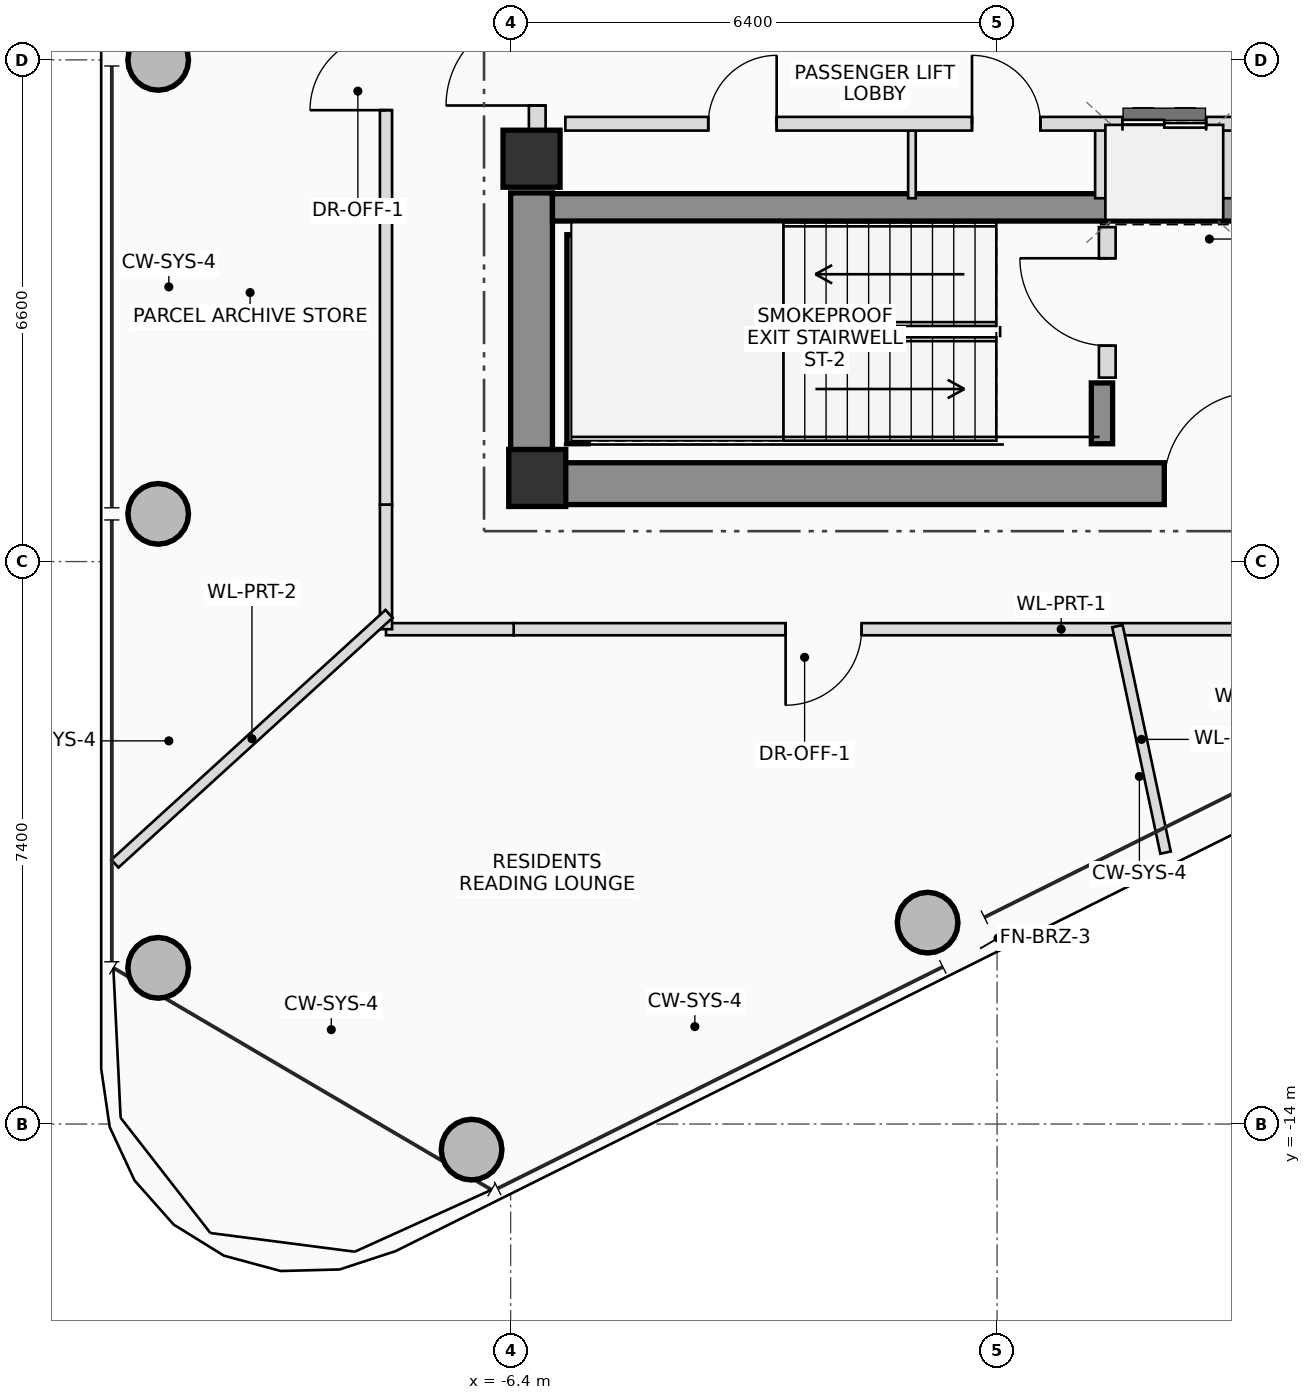
"""IFC4 building model, lengths in metres.
Left out: names, types, materials, properties, quantities, classifications, styles, units other than length and angle.
Written with IfcOpenShell. Run it as: python <this file> out.ifc"""

import sys

from ifc_helpers import new_model, si_unit, direction, frame, frame_2d, origin, origin_2d, place, context, subcontext, project, spatial, rectangle, hollow_circle, extrude, source, transform, mapped, element, fill, save


model = new_model("IFC4")
c1 = context("Model", 3, precision=1e-05, world=origin(), true_north=direction((0.0, 1.0)))
c2 = subcontext(c1, "Body", "Model", "MODEL_VIEW")
j1 = project(units=[si_unit("LENGTHUNIT", "METRE"), si_unit("PLANEANGLEUNIT", "RADIAN")], contexts=[c1])
p1 = place(None, origin())
s1 = spatial("IfcSite", under=j1, at=p1, CompositionType="ELEMENT")
p2 = place(p1, origin())
s2 = spatial("IfcBuilding", under=s1, at=p2, CompositionType="ELEMENT")
p3 = place(p2, frame((0.0, 0.0, 293.3)))
s3 = spatial("IfcBuildingStorey", under=s2, at=p3, CompositionType="ELEMENT", Elevation=293.3)
m1 = source(origin(), c2, "Body", "SweptSolid", [
    extrude(rectangle(XDim=0.75, YDim=0.75, at=origin_2d()), origin(), (0.0, 0.0, 1.0), 3.45),
])
p4 = place(p3, frame((-6.05, -5.5, 0.0), z_axis=(0.0, 0.0, 1.0), x_axis=(1.0, 0.0, 0.0)))
e1 = element("IfcColumn", 1, at=p4, inside=s3, PredefinedType="COLUMN", context=c2, shape_type="MappedRepresentation", body=[
    mapped(m1, transform((0.0, 0.0, 0.0), scale=1.0)),
])
p5 = place(p3, frame((-6.4, -5.575, 0.0), z_axis=(0.0, 0.0, 1.0), x_axis=(1.0, 0.0, 0.0)))
e2 = element("IfcWall", 2, at=p5, inside=s3, PredefinedType="SHEAR", context=c2, shape_type="SweptSolid", body=[
    extrude(rectangle(XDim=12.8, YDim=0.55, at=frame_2d((6.4, 0.0))), origin(), (0.0, 0.0, 1.0), 3.45),
])
p6 = place(p5, frame((8.6, 0.0, 0.0)))
e3 = element("IfcOpeningElement", 3, at=p6, cuts=e2, PredefinedType="OPENING", context=c2, shape_type="SweptSolid", body=[
    extrude(rectangle(XDim=1.2, YDim=2.2, at=frame_2d((0.6, 1.1))), frame((0.0, 0.285, 0.0), z_axis=(0.0, -1.0, 0.0), x_axis=(1.0, 0.0, 0.0)), (0.0, 0.0, 1.0), 0.57),
])
p7 = place(p3, frame((-6.125, -5.3, 0.0), z_axis=(0.0, 0.0, 1.0), x_axis=(0.0, 1.0, 0.0)))
e4 = element("IfcWall", 4, at=p7, inside=s3, PredefinedType="SHEAR", context=c2, shape_type="SweptSolid", body=[
    extrude(rectangle(XDim=3.55, YDim=0.55, at=frame_2d((1.775, 0.0))), origin(), (0.0, 0.0, 1.0), 3.45),
])
p8 = place(p3, frame((-5.85, -1.94, 0.0), z_axis=(0.0, 0.0, 1.0), x_axis=(1.0, 0.0, 0.0)))
e5 = element("IfcWall", 5, at=p8, inside=s3, PredefinedType="SHEAR", context=c2, shape_type="SweptSolid", body=[
    extrude(rectangle(XDim=11.7, YDim=0.36, at=frame_2d((5.85, 0.0))), origin(), (0.0, 0.0, 1.0), 3.45),
])
p9 = place(p3, frame((-5.52, -5.05, 0.0), z_axis=(0.0, 0.0, 1.0), x_axis=(0.0, 1.0, 0.0)))
e6 = element("IfcWall", 6, at=p9, inside=s3, PredefinedType="SHEAR", context=c2, shape_type="SweptSolid", body=[
    extrude(rectangle(XDim=2.75, YDim=0.28, at=frame_2d((1.375, 0.0))), origin(), (0.0, 0.0, 1.0), 3.45),
])
p10 = place(p3, frame((1.38, -5.05, 0.0), z_axis=(0.0, 0.0, 1.0), x_axis=(0.0, 1.0, 0.0)))
e7 = element("IfcWall", 7, at=p10, inside=s3, PredefinedType="SHEAR", context=c2, shape_type="SweptSolid", body=[
    extrude(rectangle(XDim=0.8, YDim=0.28, at=frame_2d((0.4, 0.0))), origin(), (0.0, 0.0, 1.0), 3.45),
])
p11 = place(p3, frame((-6.125, -1.3, 0.0), z_axis=(0.0, 0.0, 1.0), x_axis=(1.0, 0.0, 0.0)))
e8 = element("IfcColumn", 8, at=p11, inside=s3, PredefinedType="COLUMN", context=c2, shape_type="MappedRepresentation", body=[
    mapped(m1, transform((0.0, 0.0, 0.0), scale=1.0)),
])
m2 = source(origin(), c2, "Body", "SweptSolid", [
    extrude(hollow_circle(Radius=0.4, WallThickness=0.028, at=origin_2d()), origin(), (0.0, 0.0, 1.0), 3.45),
])
for number, where, z_axis, x_axis in (
    (9, (-6.914, -14.337, 0.0), (0.0, 0.0, 1.0), (1.0, 0.0, 0.0)),
    (10, (-0.914, -11.35, 0.0), (0.0, 0.0, 1.0), (1.0, 0.0, 0.0)),
    (11, (-11.037, 0.0, 0.0), (0.0, 0.0, 1.0), (1.0, 0.0, 0.0)),
    (12, (-11.037, -5.973, 0.0), (0.0, 0.0, 1.0), (1.0, 0.0, 0.0)),
    (13, (-11.037, -11.945, 0.0), (0.0, 0.0, 1.0), (1.0, 0.0, 0.0)),
):
    element("IfcColumn", number, at=place(p3, frame(where, z_axis=z_axis, x_axis=x_axis)), inside=s3, PredefinedType="COLUMN", context=c2, shape_type="MappedRepresentation", body=[
        mapped(m2, transform((0.0, 0.0, 0.0), scale=1.0)),
    ])
p12 = place(p3, frame((-6.05, -0.95, 0.0), z_axis=(0.0, 0.0, 1.0), x_axis=(0.0, 1.0, 0.0)))
e14 = element("IfcWall", 14, at=p12, inside=s3, PredefinedType="PLUMBINGWALL", context=c2, shape_type="SweptSolid", body=[
    extrude(rectangle(XDim=1.9, YDim=0.22, at=frame_2d((0.95, 0.0))), origin(), (0.0, 0.0, 1.0), 2.23),
])
p13 = place(p12, frame((0.35, 0.0, 0.0)))
e15 = element("IfcOpeningElement", 15, at=p13, cuts=e14, PredefinedType="OPENING", context=c2, shape_type="SweptSolid", body=[
    extrude(rectangle(XDim=1.2, YDim=2.2, at=frame_2d((0.6, 1.1))), frame((0.0, 0.12, 0.0), z_axis=(0.0, -1.0, 0.0), x_axis=(1.0, 0.0, 0.0)), (0.0, 0.0, 1.0), 0.24),
])
p14 = place(p3, frame((1.45, -4.18, 0.0), z_axis=(0.0, 0.0, 1.0), x_axis=(0.0, 1.0, 0.0)))
e16 = element("IfcWall", 16, at=p14, inside=s3, PredefinedType="PLUMBINGWALL", context=c2, shape_type="SweptSolid", body=[
    extrude(rectangle(XDim=1.98, YDim=0.22, at=frame_2d((0.99, 0.0))), origin(), (0.0, 0.0, 1.0), 3.25),
])
p15 = place(p14, frame((0.42, 0.0, 0.0)))
e17 = element("IfcOpeningElement", 17, at=p15, cuts=e16, PredefinedType="OPENING", context=c2, shape_type="SweptSolid", body=[
    extrude(rectangle(XDim=1.15, YDim=2.15, at=frame_2d((0.575, 1.075))), frame((0.0, 0.12, 0.0), z_axis=(0.0, -1.0, 0.0), x_axis=(1.0, 0.0, 0.0)), (0.0, 0.0, 1.0), 0.24),
])
p16 = place(p3, frame((-1.12, -1.82, 0.0), z_axis=(0.0, 0.0, 1.0), x_axis=(0.0, 1.0, 0.0)))
e18 = element("IfcWall", 18, at=p16, inside=s3, PredefinedType="PARTITIONING", context=c2, shape_type="SweptSolid", body=[
    extrude(rectangle(XDim=0.98, YDim=0.1, at=frame_2d((0.49, 0.0))), origin(), (0.0, 0.0, 1.0), 3.25),
])
for number, where, z_axis, x_axis in (
    (19, (1.38, -1.82, 0.0), (0.0, 0.0, 1.0), (0.0, 1.0, 0.0)),
    (20, (3.02, -1.82, 0.0), (0.0, 0.0, 1.0), (0.0, 1.0, 0.0)),
):
    element("IfcWall", number, at=place(p3, frame(where, z_axis=z_axis, x_axis=x_axis)), inside=s3, PredefinedType="PLUMBINGWALL", context=c2, shape_type="SweptSolid", body=[
        extrude(rectangle(XDim=0.98, YDim=0.18, at=frame_2d((0.49, 0.0))), origin(), (0.0, 0.0, 1.0), 3.25),
    ])
p17 = place(p3, frame((-5.68, -0.84, 0.0), z_axis=(0.0, 0.0, 1.0), x_axis=(1.0, 0.0, 0.0)))
e21 = element("IfcWall", 21, at=p17, inside=s3, PredefinedType="PLUMBINGWALL", context=c2, shape_type="SweptSolid", body=[
    extrude(rectangle(XDim=11.33, YDim=0.18, at=frame_2d((5.665, 0.0))), origin(), (0.0, 0.0, 1.0), 3.25),
])
p18 = place(p17, frame((1.88, 0.0, 0.0)))
e22 = element("IfcOpeningElement", 22, at=p18, cuts=e21, PredefinedType="OPENING", context=c2, shape_type="SweptSolid", body=[
    extrude(rectangle(XDim=0.9, YDim=2.05, at=frame_2d((0.45, 1.025))), frame((0.0, 0.1, 0.0), z_axis=(0.0, -1.0, 0.0), x_axis=(1.0, 0.0, 0.0)), (0.0, 0.0, 1.0), 0.2),
])
p19 = place(p17, frame((5.35, 0.0, 0.0)))
e23 = element("IfcOpeningElement", 23, at=p19, cuts=e21, PredefinedType="OPENING", context=c2, shape_type="SweptSolid", body=[
    extrude(rectangle(XDim=0.9, YDim=2.05, at=frame_2d((0.45, 1.025))), frame((0.0, 0.1, 0.0), z_axis=(0.0, -1.0, 0.0), x_axis=(1.0, 0.0, 0.0)), (0.0, 0.0, 1.0), 0.2),
])
p20 = place(p17, frame((7.33, 0.0, 0.0)))
e24 = element("IfcOpeningElement", 24, at=p20, cuts=e21, PredefinedType="OPENING", context=c2, shape_type="SweptSolid", body=[
    extrude(rectangle(XDim=1.1, YDim=2.2, at=frame_2d((0.55, 1.1))), frame((0.0, 0.1, 0.0), z_axis=(0.0, -1.0, 0.0), x_axis=(1.0, 0.0, 0.0)), (0.0, 0.0, 1.0), 0.2),
])
p21 = place(p17, frame((8.9, 0.0, 0.0)))
e25 = element("IfcOpeningElement", 25, at=p21, cuts=e21, PredefinedType="OPENING", context=c2, shape_type="SweptSolid", body=[
    extrude(rectangle(XDim=0.9, YDim=2.05, at=frame_2d((0.45, 1.025))), frame((0.0, 0.1, 0.0), z_axis=(0.0, -1.0, 0.0), x_axis=(1.0, 0.0, 0.0)), (0.0, 0.0, 1.0), 0.2),
])
p22 = place(p17, frame((10.25, 0.0, 0.0)))
e26 = element("IfcOpeningElement", 26, at=p22, cuts=e21, PredefinedType="OPENING", context=c2, shape_type="SweptSolid", body=[
    extrude(rectangle(XDim=0.9, YDim=2.05, at=frame_2d((0.45, 1.025))), frame((0.0, 0.1, 0.0), z_axis=(0.0, -1.0, 0.0), x_axis=(1.0, 0.0, 0.0)), (0.0, 0.0, 1.0), 0.2),
])
p23 = place(p3, frame((3.319, -7.49, 0.0), z_axis=(0.0, 0.0, 1.0), x_axis=(-1.0, 0.0, 0.0)))
e27 = element("IfcWall", 27, at=p23, inside=s3, PredefinedType="PARTITIONING", context=c2, shape_type="SweptSolid", body=[
    extrude(rectangle(XDim=9.679, YDim=0.16, at=frame_2d((4.84, 0.0))), origin(), (0.0, 0.0, 1.0), 2.655),
])
p24 = place(p23, frame((5.101, 0.0, 0.0)))
e28 = element("IfcOpeningElement", 28, at=p24, cuts=e27, PredefinedType="OPENING", context=c2, shape_type="SweptSolid", body=[
    extrude(rectangle(XDim=1.0, YDim=2.25, at=frame_2d((0.5, 1.125))), frame((0.0, 0.09, 0.0), z_axis=(0.0, -1.0, 0.0), x_axis=(1.0, 0.0, 0.0)), (0.0, 0.0, 1.0), 0.18),
])
p25 = place(p3, frame((-6.36, -7.49, 0.0), z_axis=(0.0, 0.0, 1.0), x_axis=(-1.0, 0.0, 0.0)))
e29 = element("IfcWall", 29, at=p25, inside=s3, PredefinedType="PARTITIONING", context=c2, shape_type="SweptSolid", body=[
    extrude(rectangle(XDim=1.68, YDim=0.16, at=frame_2d((0.84, 0.0))), origin(), (0.0, 0.0, 1.0), 2.655),
])
p26 = place(p3, frame((-8.04, -7.49, 0.0), z_axis=(0.0, 0.0, 1.0), x_axis=(0.0, 1.0, 0.0)))
e30 = element("IfcWall", 30, at=p26, inside=s3, PredefinedType="PARTITIONING", context=c2, shape_type="SweptSolid", body=[
    extrude(rectangle(XDim=1.64, YDim=0.16, at=frame_2d((0.82, 0.0))), origin(), (0.0, 0.0, 1.0), 3.25),
])
p27 = place(p3, frame((-8.04, -5.85, 0.0), z_axis=(0.0, 0.0, 1.0), x_axis=(0.0, 1.0, 0.0)))
e31 = element("IfcWall", 31, at=p27, inside=s3, PredefinedType="PARTITIONING", context=c2, shape_type="SweptSolid", body=[
    extrude(rectangle(XDim=11.7, YDim=0.16, at=frame_2d((5.85, 0.0))), origin(), (0.0, 0.0, 1.0), 2.655),
])
p28 = place(p27, frame((5.189, 0.0, 0.0)))
e32 = element("IfcOpeningElement", 32, at=p28, cuts=e31, PredefinedType="OPENING", context=c2, shape_type="SweptSolid", body=[
    extrude(rectangle(XDim=1.0, YDim=2.25, at=frame_2d((0.5, 1.125))), frame((0.0, 0.09, 0.0), z_axis=(0.0, -1.0, 0.0), x_axis=(1.0, 0.0, 0.0)), (0.0, 0.0, 1.0), 0.18),
])
p29 = place(p3, frame((-8.0, -7.288, 0.0), z_axis=(0.0, 0.0, 1.0), x_axis=(-0.739260540131, -0.673419522886, 0.0)))
e33 = element("IfcWall", 33, at=p29, inside=s3, PredefinedType="PARTITIONING", context=c2, shape_type="SweptSolid", body=[
    extrude(rectangle(XDim=4.88, YDim=0.14, at=frame_2d((2.44, 0.0))), origin(), (0.0, 0.0, 1.0), 2.815),
])
p30 = place(p3, frame((1.583, -7.45, 0.0), z_axis=(0.0, 0.0, 1.0), x_axis=(0.207941206443, -0.978141326529, 0.0)))
e34 = element("IfcWall", 34, at=p30, inside=s3, PredefinedType="PARTITIONING", context=c2, shape_type="SweptSolid", body=[
    extrude(rectangle(XDim=3.046, YDim=0.14, at=frame_2d((1.523, 0.0))), origin(), (0.0, 0.0, 1.0), 2.815),
])
p31 = place(p6, origin())
e35 = element("IfcDoor", 35, at=p31, inside=s3, OperationType="SINGLE_SWING_RIGHT", PredefinedType="DOOR", context=c2, shape_type="SweptSolid", body=[
    extrude(rectangle(XDim=1.2, YDim=2.2, at=frame_2d((0.6, 1.1))), frame((0.0, 0.025, 0.0), z_axis=(0.0, -1.0, 0.0), x_axis=(1.0, 0.0, 0.0)), (0.0, 0.0, 1.0), 0.05),
])
fill(e3, e35)
p32 = place(p13, origin())
e36 = element("IfcDoor", 36, at=p32, inside=s3, OperationType="SINGLE_SWING_LEFT", PredefinedType="DOOR", context=c2, shape_type="SweptSolid", body=[
    extrude(rectangle(XDim=1.2, YDim=2.2, at=frame_2d((0.6, 1.1))), frame((0.0, 0.025, 0.0), z_axis=(0.0, -1.0, 0.0), x_axis=(1.0, 0.0, 0.0)), (0.0, 0.0, 1.0), 0.05),
])
fill(e15, e36)
p33 = place(p15, origin())
e37 = element("IfcDoor", 37, at=p33, inside=s3, OperationType="SINGLE_SWING_RIGHT", PredefinedType="DOOR", context=c2, shape_type="SweptSolid", body=[
    extrude(rectangle(XDim=1.15, YDim=2.15, at=frame_2d((0.575, 1.075))), frame((0.0, 0.025, 0.0), z_axis=(0.0, -1.0, 0.0), x_axis=(1.0, 0.0, 0.0)), (0.0, 0.0, 1.0), 0.05),
])
fill(e17, e37)
p34 = place(p18, origin())
e38 = element("IfcDoor", 38, at=p34, inside=s3, OperationType="SINGLE_SWING_RIGHT", PredefinedType="DOOR", context=c2, shape_type="SweptSolid", body=[
    extrude(rectangle(XDim=0.9, YDim=2.05, at=frame_2d((0.45, 1.025))), frame((0.0, 0.025, 0.0), z_axis=(0.0, -1.0, 0.0), x_axis=(1.0, 0.0, 0.0)), (0.0, 0.0, 1.0), 0.05),
])
fill(e22, e38)
p35 = place(p19, origin())
e39 = element("IfcDoor", 39, at=p35, inside=s3, OperationType="SINGLE_SWING_LEFT", PredefinedType="DOOR", context=c2, shape_type="SweptSolid", body=[
    extrude(rectangle(XDim=0.9, YDim=2.05, at=frame_2d((0.45, 1.025))), frame((0.0, 0.025, 0.0), z_axis=(0.0, -1.0, 0.0), x_axis=(1.0, 0.0, 0.0)), (0.0, 0.0, 1.0), 0.05),
])
fill(e23, e39)
p36 = place(p20, origin())
e40 = element("IfcDoor", 40, at=p36, inside=s3, OperationType="DOUBLE_DOOR_SLIDING", PredefinedType="DOOR", context=c2, shape_type="SweptSolid", body=[
    extrude(rectangle(XDim=1.1, YDim=2.2, at=frame_2d((0.55, 1.1))), frame((0.0, 0.025, 0.0), z_axis=(0.0, -1.0, 0.0), x_axis=(1.0, 0.0, 0.0)), (0.0, 0.0, 1.0), 0.05),
])
fill(e24, e40)
p37 = place(p24, origin())
e41 = element("IfcDoor", 41, at=p37, inside=s3, OperationType="SINGLE_SWING_RIGHT", PredefinedType="DOOR", context=c2, shape_type="SweptSolid", body=[
    extrude(rectangle(XDim=1.0, YDim=2.25, at=frame_2d((0.5, 1.125))), frame((0.0, 0.025, 0.0), z_axis=(0.0, -1.0, 0.0), x_axis=(1.0, 0.0, 0.0)), (0.0, 0.0, 1.0), 0.05),
])
fill(e28, e41)
p38 = place(p28, origin())
e42 = element("IfcDoor", 42, at=p38, inside=s3, OperationType="SINGLE_SWING_LEFT", PredefinedType="DOOR", context=c2, shape_type="SweptSolid", body=[
    extrude(rectangle(XDim=1.0, YDim=2.25, at=frame_2d((0.5, 1.125))), frame((0.0, 0.025, 0.0), z_axis=(0.0, -1.0, 0.0), x_axis=(1.0, 0.0, 0.0)), (0.0, 0.0, 1.0), 0.05),
])
fill(e32, e42)
save(model, sys.argv[1])
